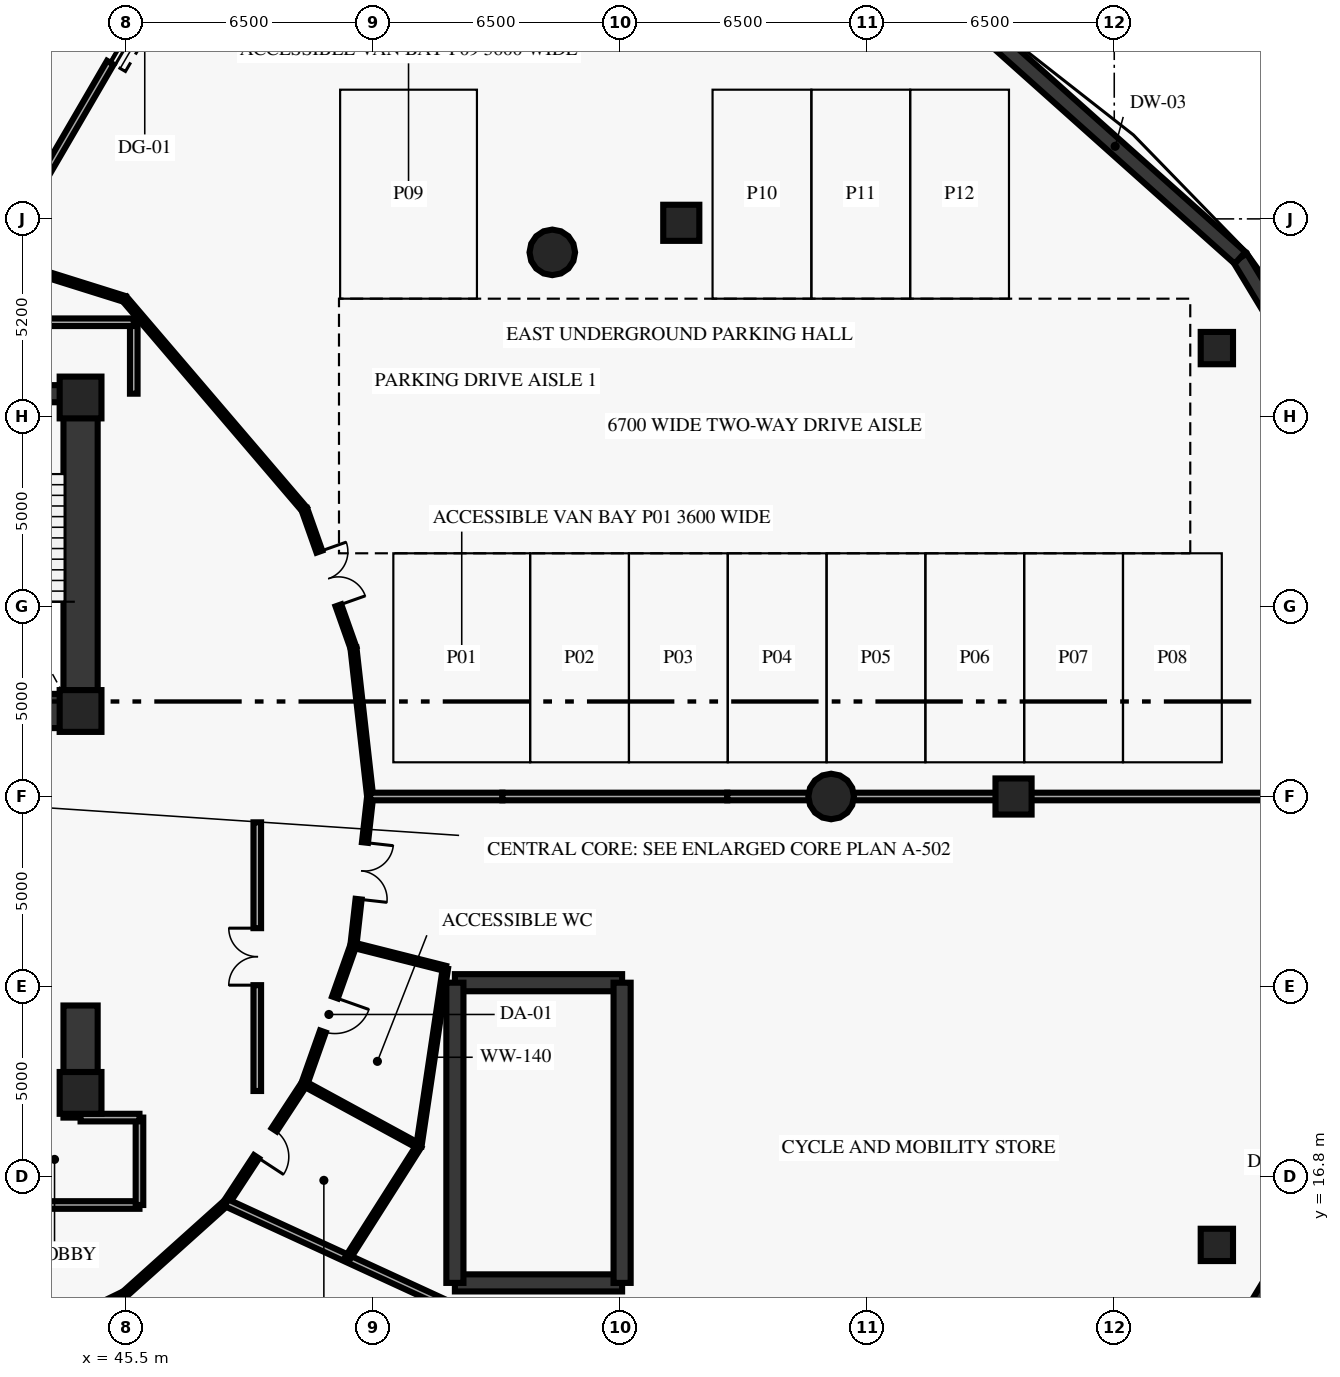
"""IFC4 building model, lengths in metres.
Left out: names, types, materials, properties, quantities, classifications, styles, units other than length and angle.
Written with IfcOpenShell. Run it as: python <this file> out.ifc"""

import sys

from ifc_helpers import new_model, si_unit, direction, frame, frame_2d, origin, origin_2d, place, context, subcontext, project, spatial, rectangle, circle, extrude, element, fill, save


model = new_model("IFC4")
c1 = context("Model", 3, precision=1e-05, world=origin(), true_north=direction((0.0, 1.0)))
c2 = subcontext(c1, "Body", "Model", "MODEL_VIEW")
j1 = project(units=[si_unit("LENGTHUNIT", "METRE"), si_unit("PLANEANGLEUNIT", "RADIAN")], contexts=[c1])
p1 = place(None, origin())
s1 = spatial("IfcSite", under=j1, at=p1, CompositionType="ELEMENT")
p2 = place(p1, origin())
s2 = spatial("IfcBuilding", under=s1, at=p2, CompositionType="ELEMENT")
p3 = place(p2, frame((0.0, 0.0, -4.5)))
s3 = spatial("IfcBuildingStorey", under=s2, at=p3, CompositionType="ELEMENT", Elevation=-4.5)
for number, where, z_axis, x_axis in (
    (1, (44.3, 19.0, 0.0), (0.0, 0.0, 1.0), (1.0, 0.0, 0.0)),
    (2, (44.3, 29.05, 0.0), (0.0, 0.0, 1.0), (1.0, 0.0, 0.0)),
    (3, (44.3, 37.3, 0.0), (0.0, 0.0, 1.0), (1.0, 0.0, 0.0)),
):
    element("IfcColumn", number, at=place(p3, frame(where, z_axis=z_axis, x_axis=x_axis)), inside=s3, PredefinedType="PILASTER", context=c2, shape_type="SweptSolid", body=[
        extrude(rectangle(XDim=1.1, YDim=1.1, at=origin_2d()), origin(), (0.0, 0.0, 1.0), 4.18),
    ])
for number, where, z_axis, x_axis in (
    (4, (64.05, 26.8, 0.0), (0.0, 0.0, 1.0), (1.0, 0.0, 0.0)),
    (5, (56.713, 41.119, 0.0), (0.0, 0.0, 1.0), (1.0, 0.0, 0.0)),
):
    element("IfcColumn", number, at=place(p3, frame(where, z_axis=z_axis, x_axis=x_axis)), inside=s3, PredefinedType="COLUMN", context=c2, shape_type="SweptSolid", body=[
        extrude(circle(Radius=0.6, at=origin_2d()), origin(), (0.0, 0.0, 1.0), 4.18),
    ])
for number, where, z_axis, x_axis in (
    (6, (68.85, 26.8, 0.0), (0.0, 0.0, 1.0), (1.0, 0.0, 0.0)),
    (7, (60.107, 41.897, 0.0), (0.0, 0.0, 1.0), (1.0, 0.0, 0.0)),
):
    element("IfcColumn", number, at=place(p3, frame(where, z_axis=z_axis, x_axis=x_axis)), inside=s3, PredefinedType="COLUMN", context=c2, shape_type="SweptSolid", body=[
        extrude(rectangle(XDim=0.95, YDim=0.95, at=origin_2d()), origin(), (0.0, 0.0, 1.0), 4.18),
    ])
for number, where, z_axis, x_axis in (
    (8, (74.2, 15.0, 0.0), (0.0, 0.0, 1.0), (1.0, 0.0, 0.0)),
    (9, (74.2, 38.6, 0.0), (0.0, 0.0, 1.0), (1.0, 0.0, 0.0)),
):
    element("IfcColumn", number, at=place(p3, frame(where, z_axis=z_axis, x_axis=x_axis)), inside=s3, PredefinedType="COLUMN", context=c2, shape_type="SweptSolid", body=[
        extrude(rectangle(XDim=0.85, YDim=0.85, at=origin_2d()), origin(), (0.0, 0.0, 1.0), 4.18),
    ])
p4 = place(p3, frame((44.3, 29.05, 0.0), z_axis=(0.0, 0.0, 1.0), x_axis=(0.0, 1.0, 0.0)))
e10 = element("IfcWall", 10, at=p4, inside=s3, PredefinedType="SHEAR", context=c2, shape_type="SweptSolid", body=[
    extrude(rectangle(XDim=8.35, YDim=0.9, at=frame_2d((4.175, 0.0))), origin(), (0.0, 0.0, 1.0), 4.18),
])
p5 = place(p3, frame((44.3, 18.35, 0.0), z_axis=(0.0, 0.0, 1.0), x_axis=(0.0, 1.0, 0.0)))
e11 = element("IfcWall", 11, at=p5, inside=s3, PredefinedType="SHEAR", context=c2, shape_type="SweptSolid", body=[
    extrude(rectangle(XDim=2.95, YDim=0.9, at=frame_2d((1.475, 0.0))), origin(), (0.0, 0.0, 1.0), 4.18),
])
p6 = place(p3, frame((33.7, 29.05, 0.0), z_axis=(0.0, 0.0, 1.0), x_axis=(1.0, 0.0, 0.0)))
e12 = element("IfcWall", 12, at=p6, inside=s3, PredefinedType="SHEAR", context=c2, shape_type="SweptSolid", body=[
    extrude(rectangle(XDim=10.6, YDim=0.9, at=frame_2d((5.3, 0.0))), origin(), (0.0, 0.0, 1.0), 4.18),
])
p7 = place(p3, frame((78.941, 34.138, 0.0), z_axis=(0.0, 0.0, 1.0), x_axis=(-0.517122636798, 0.85591131463, 0.0)))
e13 = element("IfcWall", 13, at=p7, inside=s3, PredefinedType="SHEAR", context=c2, shape_type="SweptSolid", body=[
    extrude(rectangle(XDim=7.988, YDim=0.42, at=frame_2d((3.994, 0.0))), origin(), (0.0, 0.0, 1.0), 4.18),
])
p8 = place(p3, frame((74.81, 40.975, 0.0), z_axis=(0.0, 0.0, 1.0), x_axis=(-0.745720826992, 0.666258544554, 0.0)))
e14 = element("IfcWall", 14, at=p8, inside=s3, PredefinedType="SHEAR", context=c2, shape_type="SweptSolid", body=[
    extrude(rectangle(XDim=8.812, YDim=0.42, at=frame_2d((4.406, 0.0))), origin(), (0.0, 0.0, 1.0), 4.18),
])
p9 = place(p3, frame((74.81, 12.625, 0.0), z_axis=(0.0, 0.0, 1.0), x_axis=(0.517136164524, 0.855903141332, 0.0)))
e15 = element("IfcWall", 15, at=p9, inside=s3, PredefinedType="SHEAR", context=c2, shape_type="SweptSolid", body=[
    extrude(rectangle(XDim=7.988, YDim=0.42, at=frame_2d((3.994, 0.0))), origin(), (0.0, 0.0, 1.0), 4.18),
])
p10 = place(p3, frame((44.3, 37.4, 0.0), z_axis=(0.0, 0.0, 1.0), x_axis=(-1.0, 0.0, 0.0)))
e16 = element("IfcWall", 16, at=p10, inside=s3, PredefinedType="SHEAR", context=c2, shape_type="SweptSolid", body=[
    extrude(rectangle(XDim=3.65, YDim=0.45, at=frame_2d((1.825, 0.0))), origin(), (0.0, 0.0, 1.0), 4.18),
])
p11 = place(p10, frame((1.25, 0.0, 0.0)))
e17 = element("IfcOpeningElement", 17, at=p11, cuts=e16, PredefinedType="OPENING", context=c2, shape_type="SweptSolid", body=[
    extrude(rectangle(XDim=1.15, YDim=2.15, at=frame_2d((0.575, 1.075))), frame((0.0, 0.235, 0.0), z_axis=(0.0, -1.0, 0.0), x_axis=(1.0, 0.0, 0.0)), (0.0, 0.0, 1.0), 0.47),
])
for number, where, z_axis, x_axis in (
    (18, (54.15, 14.0, 0.0), (0.0, 0.0, 1.0), (1.0, 0.0, 0.0)),
    (19, (54.15, 21.9, 0.0), (0.0, 0.0, 1.0), (1.0, 0.0, 0.0)),
):
    element("IfcWall", number, at=place(p3, frame(where, z_axis=z_axis, x_axis=x_axis)), inside=s3, PredefinedType="SHEAR", context=c2, shape_type="SweptSolid", body=[
        extrude(rectangle(XDim=4.4, YDim=0.45, at=frame_2d((2.2, 0.0))), origin(), (0.0, 0.0, 1.0), 4.18),
    ])
for number, where, z_axis, x_axis in (
    (20, (54.15, 14.0, 0.0), (0.0, 0.0, 1.0), (0.0, 1.0, 0.0)),
    (21, (58.55, 14.0, 0.0), (0.0, 0.0, 1.0), (0.0, 1.0, 0.0)),
):
    element("IfcWall", number, at=place(p3, frame(where, z_axis=z_axis, x_axis=x_axis)), inside=s3, PredefinedType="SHEAR", context=c2, shape_type="SweptSolid", body=[
        extrude(rectangle(XDim=7.9, YDim=0.45, at=frame_2d((3.95, 0.0))), origin(), (0.0, 0.0, 1.0), 4.18),
    ])
p12 = place(p3, frame((45.7, 37.4, 0.0), z_axis=(0.0, 0.0, 1.0), x_axis=(0.0, 1.0, 0.0)))
e22 = element("IfcWall", 22, at=p12, inside=s3, PredefinedType="SOLIDWALL", context=c2, shape_type="SweptSolid", body=[
    extrude(rectangle(XDim=1.88, YDim=0.2, at=frame_2d((0.94, 0.0))), origin(), (0.0, 0.0, 1.0), 4.18),
])
p13 = place(p3, frame((45.7, 39.28, 0.0), z_axis=(0.0, 0.0, 1.0), x_axis=(-1.0, 0.0, 0.0)))
e23 = element("IfcWall", 23, at=p13, inside=s3, PredefinedType="SOLIDWALL", context=c2, shape_type="SweptSolid", body=[
    extrude(rectangle(XDim=6.6, YDim=0.2, at=frame_2d((3.3, 0.0))), origin(), (0.0, 0.0, 1.0), 4.18),
])
p14 = place(p13, frame((4.35, 0.0, 0.0)))
e24 = element("IfcOpeningElement", 24, at=p14, cuts=e23, PredefinedType="OPENING", context=c2, shape_type="SweptSolid", body=[
    extrude(rectangle(XDim=1.6, YDim=2.2, at=frame_2d((0.8, 1.1))), frame((0.0, 0.11, 0.0), z_axis=(0.0, -1.0, 0.0), x_axis=(1.0, 0.0, 0.0)), (0.0, 0.0, 1.0), 0.22),
])
p15 = place(p3, frame((48.95, 19.05, 0.0), z_axis=(0.0, 0.0, 1.0), x_axis=(0.0, 1.0, 0.0)))
e25 = element("IfcWall", 25, at=p15, inside=s3, PredefinedType="SOLIDWALL", context=c2, shape_type="SweptSolid", body=[
    extrude(rectangle(XDim=7.07, YDim=0.2, at=frame_2d((3.535, 0.0))), origin(), (0.0, 0.0, 1.0), 4.18),
])
p16 = place(p15, frame((2.785, 0.0, 0.0)))
e26 = element("IfcOpeningElement", 26, at=p16, cuts=e25, PredefinedType="OPENING", context=c2, shape_type="SweptSolid", body=[
    extrude(rectangle(XDim=1.5, YDim=2.2, at=frame_2d((0.75, 1.1))), frame((0.0, 0.11, 0.0), z_axis=(0.0, -1.0, 0.0), x_axis=(1.0, 0.0, 0.0)), (0.0, 0.0, 1.0), 0.22),
])
p17 = place(p3, frame((41.35, 16.05, 0.0), z_axis=(0.0, 0.0, 1.0), x_axis=(1.0, 0.0, 0.0)))
e27 = element("IfcWall", 27, at=p17, inside=s3, PredefinedType="SOLIDWALL", context=c2, shape_type="SweptSolid", body=[
    extrude(rectangle(XDim=4.5, YDim=0.2, at=frame_2d((2.25, 0.0))), origin(), (0.0, 0.0, 1.0), 4.18),
])
p18 = place(p3, frame((45.85, 16.05, 0.0), z_axis=(0.0, 0.0, 1.0), x_axis=(0.0, 1.0, 0.0)))
e28 = element("IfcWall", 28, at=p18, inside=s3, PredefinedType="SOLIDWALL", context=c2, shape_type="SweptSolid", body=[
    extrude(rectangle(XDim=2.3, YDim=0.2, at=frame_2d((1.15, 0.0))), origin(), (0.0, 0.0, 1.0), 4.18),
])
p19 = place(p3, frame((44.3, 18.35, 0.0), z_axis=(0.0, 0.0, 1.0), x_axis=(1.0, 0.0, 0.0)))
e29 = element("IfcWall", 29, at=p19, inside=s3, PredefinedType="SOLIDWALL", context=c2, shape_type="SweptSolid", body=[
    extrude(rectangle(XDim=1.55, YDim=0.2, at=frame_2d((0.775, 0.0))), origin(), (0.0, 0.0, 1.0), 4.18),
])
p20 = place(p3, frame((51.92, 26.8, 0.0), z_axis=(0.0, 0.0, 1.0), x_axis=(-0.111731247657, 0.993738460711, 0.0)))
e30 = element("IfcWall", 30, at=p20, inside=s3, PredefinedType="PARTITIONING", context=c2, shape_type="SweptSolid", body=[
    extrude(rectangle(XDim=3.938, YDim=0.16, at=frame_2d((1.969, 0.0))), origin(), (0.0, 0.0, 1.0), 4.18),
])
p21 = place(p3, frame((50.189, 34.36, 0.0), z_axis=(0.0, 0.0, 1.0), x_axis=(0.333684770033, -0.942684716248, 0.0)))
e31 = element("IfcWall", 31, at=p21, inside=s3, PredefinedType="PARTITIONING", context=c2, shape_type="SweptSolid", body=[
    extrude(rectangle(XDim=3.869, YDim=0.16, at=frame_2d((1.935, 0.0))), origin(), (0.0, 0.0, 1.0), 4.18),
])
p22 = place(p21, frame((1.184, 0.0, 0.0)))
e32 = element("IfcOpeningElement", 32, at=p22, cuts=e31, PredefinedType="OPENING", context=c2, shape_type="SweptSolid", body=[
    extrude(rectangle(XDim=1.5, YDim=2.2, at=frame_2d((0.75, 1.1))), frame((0.0, 0.09, 0.0), z_axis=(0.0, -1.0, 0.0), x_axis=(1.0, 0.0, 0.0)), (0.0, 0.0, 1.0), 0.18),
])
p23 = place(p3, frame((50.189, 34.36, 0.0), z_axis=(0.0, 0.0, 1.0), x_axis=(-0.649652680018, 0.760231145998, 0.0)))
e33 = element("IfcWall", 33, at=p23, inside=s3, PredefinedType="PARTITIONING", context=c2, shape_type="SweptSolid", body=[
    extrude(rectangle(XDim=7.279, YDim=0.16, at=frame_2d((3.64, 0.0))), origin(), (0.0, 0.0, 1.0), 4.18),
])
p24 = place(p3, frame((45.46, 39.894, 0.0), z_axis=(0.0, 0.0, 1.0), x_axis=(-0.95417919824, 0.29923578938, 0.0)))
e34 = element("IfcWall", 34, at=p24, inside=s3, PredefinedType="PARTITIONING", context=c2, shape_type="SweptSolid", body=[
    extrude(rectangle(XDim=6.77, YDim=0.16, at=frame_2d((3.385, 0.0))), origin(), (0.0, 0.0, 1.0), 4.18),
])
p25 = place(p3, frame((45.46, 13.706, 0.0), z_axis=(0.0, 0.0, 1.0), x_axis=(-0.899789784655, -0.436323668199, 0.0)))
e35 = element("IfcWall", 35, at=p25, inside=s3, PredefinedType="PARTITIONING", context=c2, shape_type="SweptSolid", body=[
    extrude(rectangle(XDim=3.463, YDim=0.16, at=frame_2d((1.731, 0.0))), origin(), (0.0, 0.0, 1.0), 4.18),
])
p26 = place(p25, frame((0.982, 0.0, 0.0)))
e36 = element("IfcOpeningElement", 36, at=p26, cuts=e35, PredefinedType="OPENING", context=c2, shape_type="SweptSolid", body=[
    extrude(rectangle(XDim=1.5, YDim=2.2, at=frame_2d((0.75, 1.1))), frame((0.0, 0.09, 0.0), z_axis=(0.0, -1.0, 0.0), x_axis=(1.0, 0.0, 0.0)), (0.0, 0.0, 1.0), 0.18),
])
p27 = place(p3, frame((45.46, 13.706, 0.0), z_axis=(0.0, 0.0, 1.0), x_axis=(0.744066617248, 0.668105432621, 0.0)))
e37 = element("IfcWall", 37, at=p27, inside=s3, PredefinedType="PARTITIONING", context=c2, shape_type="SweptSolid", body=[
    extrude(rectangle(XDim=3.596, YDim=0.16, at=frame_2d((1.798, 0.0))), origin(), (0.0, 0.0, 1.0), 4.18),
])
p28 = place(p3, frame((50.189, 19.24, 0.0), z_axis=(0.0, 0.0, 1.0), x_axis=(-0.548318837904, -0.836269365694, 0.0)))
e38 = element("IfcWall", 38, at=p28, inside=s3, PredefinedType="PARTITIONING", context=c2, shape_type="SweptSolid", body=[
    extrude(rectangle(XDim=3.744, YDim=0.16, at=frame_2d((1.872, 0.0))), origin(), (0.0, 0.0, 1.0), 4.18),
])
p29 = place(p28, frame((1.447, 0.0, 0.0)))
e39 = element("IfcOpeningElement", 39, at=p29, cuts=e38, PredefinedType="OPENING", context=c2, shape_type="SweptSolid", body=[
    extrude(rectangle(XDim=0.85, YDim=2.1, at=frame_2d((0.425, 1.05))), frame((0.0, 0.09, 0.0), z_axis=(0.0, -1.0, 0.0), x_axis=(1.0, 0.0, 0.0)), (0.0, 0.0, 1.0), 0.18),
])
p30 = place(p3, frame((51.48, 22.887, 0.0), z_axis=(0.0, 0.0, 1.0), x_axis=(-0.333704620558, -0.942677689467, 0.0)))
e40 = element("IfcWall", 40, at=p30, inside=s3, PredefinedType="PARTITIONING", context=c2, shape_type="SweptSolid", body=[
    extrude(rectangle(XDim=3.869, YDim=0.16, at=frame_2d((1.934, 0.0))), origin(), (0.0, 0.0, 1.0), 4.18),
])
p31 = place(p30, frame((1.459, 0.0, 0.0)))
e41 = element("IfcOpeningElement", 41, at=p31, cuts=e40, PredefinedType="OPENING", context=c2, shape_type="SweptSolid", body=[
    extrude(rectangle(XDim=0.95, YDim=2.1, at=frame_2d((0.475, 1.05))), frame((0.0, 0.09, 0.0), z_axis=(0.0, -1.0, 0.0), x_axis=(1.0, 0.0, 0.0)), (0.0, 0.0, 1.0), 0.18),
])
p32 = place(p3, frame((51.92, 26.8, 0.0), z_axis=(0.0, 0.0, 1.0), x_axis=(-0.111724363671, -0.99373923469, 0.0)))
e42 = element("IfcWall", 42, at=p32, inside=s3, PredefinedType="PARTITIONING", context=c2, shape_type="SweptSolid", body=[
    extrude(rectangle(XDim=3.938, YDim=0.16, at=frame_2d((1.969, 0.0))), origin(), (0.0, 0.0, 1.0), 4.18),
])
p33 = place(p32, frame((1.219, 0.0, 0.0)))
e43 = element("IfcOpeningElement", 43, at=p33, cuts=e42, PredefinedType="OPENING", context=c2, shape_type="SweptSolid", body=[
    extrude(rectangle(XDim=1.5, YDim=2.2, at=frame_2d((0.75, 1.1))), frame((0.0, 0.09, 0.0), z_axis=(0.0, -1.0, 0.0), x_axis=(1.0, 0.0, 0.0)), (0.0, 0.0, 1.0), 0.18),
])
p34 = place(p3, frame((51.92, 26.8, 0.0), z_axis=(0.0, 0.0, 1.0), x_axis=(1.0, 0.0, 0.0)))
e44 = element("IfcWall", 44, at=p34, inside=s3, PredefinedType="SOLIDWALL", context=c2, shape_type="SweptSolid", body=[
    extrude(rectangle(XDim=3.48, YDim=0.2, at=frame_2d((1.74, 0.0))), origin(), (0.0, 0.0, 1.0), 4.18),
])
p35 = place(p3, frame((55.4, 26.8, 0.0), z_axis=(0.0, 0.0, 1.0), x_axis=(1.0, 0.0, 0.0)))
e45 = element("IfcWall", 45, at=p35, inside=s3, PredefinedType="SOLIDWALL", context=c2, shape_type="SweptSolid", body=[
    extrude(rectangle(XDim=5.917, YDim=0.2, at=frame_2d((2.958, 0.0))), origin(), (0.0, 0.0, 1.0), 4.18),
])
p36 = place(p3, frame((61.317, 26.8, 0.0), z_axis=(0.0, 0.0, 1.0), x_axis=(1.0, 0.0, 0.0)))
e46 = element("IfcWall", 46, at=p36, inside=s3, PredefinedType="SOLIDWALL", context=c2, shape_type="SweptSolid", body=[
    extrude(rectangle(XDim=7.533, YDim=0.2, at=frame_2d((3.767, 0.0))), origin(), (0.0, 0.0, 1.0), 3.14),
])
p37 = place(p3, frame((68.85, 26.8, 0.0), z_axis=(0.0, 0.0, 1.0), x_axis=(1.0, 0.0, 0.0)))
e47 = element("IfcWall", 47, at=p37, inside=s3, PredefinedType="SOLIDWALL", context=c2, shape_type="SweptSolid", body=[
    extrude(rectangle(XDim=11.235, YDim=0.2, at=frame_2d((5.617, 0.0))), origin(), (0.0, 0.0, 1.0), 4.18),
])
p38 = place(p3, frame((42.344, 41.405, 0.0), z_axis=(0.0, 0.0, 1.0), x_axis=(0.503097710949, 0.864229537355, 0.0)))
e48 = element("IfcWall", 48, at=p38, inside=s3, PredefinedType="SOLIDWALL", context=c2, shape_type="SweptSolid", body=[
    extrude(rectangle(XDim=14.49, YDim=0.2, at=frame_2d((7.245, 0.0))), origin(), (0.0, 0.0, 1.0), 4.18),
])
p39 = place(p38, frame((5.445, 0.0, 0.0)))
e49 = element("IfcOpeningElement", 49, at=p39, cuts=e48, PredefinedType="OPENING", context=c2, shape_type="SweptSolid", body=[
    extrude(rectangle(XDim=3.6, YDim=2.4, at=frame_2d((1.8, 1.2))), frame((0.0, 0.11, 0.0), z_axis=(0.0, -1.0, 0.0), x_axis=(1.0, 0.0, 0.0)), (0.0, 0.0, 1.0), 0.22),
])
p40 = place(p3, frame((48.136, 16.109, 0.0), z_axis=(0.0, 0.0, 1.0), x_axis=(0.908368089602, -0.418171512411, 0.0)))
e50 = element("IfcWall", 50, at=p40, inside=s3, PredefinedType="SOLIDWALL", context=c2, shape_type="SweptSolid", body=[
    extrude(rectangle(XDim=12.26, YDim=0.2, at=frame_2d((6.13, 0.0))), origin(), (0.0, 0.0, 1.0), 4.18),
])
p41 = place(p3, frame((50.189, 19.24, 0.0), z_axis=(0.0, 0.0, 1.0), x_axis=(0.878392721738, -0.477939563541, 0.0)))
e51 = element("IfcWall", 51, at=p41, inside=s3, PredefinedType="PARTITIONING", context=c2, shape_type="SweptSolid", body=[
    extrude(rectangle(XDim=3.431, YDim=0.14, at=frame_2d((1.716, 0.0))), origin(), (0.0, 0.0, 1.0), 4.18),
])
p42 = place(p3, frame((51.48, 22.887, 0.0), z_axis=(0.0, 0.0, 1.0), x_axis=(0.969564374521, -0.244836524357, 0.0)))
e52 = element("IfcWall", 52, at=p42, inside=s3, PredefinedType="PARTITIONING", context=c2, shape_type="SweptSolid", body=[
    extrude(rectangle(XDim=2.496, YDim=0.14, at=frame_2d((1.248, 0.0))), origin(), (0.0, 0.0, 1.0), 4.18),
])
p43 = place(p3, frame((51.322, 14.642, 0.0), z_axis=(0.0, 0.0, 1.0), x_axis=(0.53656900511, 0.84385644677, 0.0)))
e53 = element("IfcWall", 53, at=p43, inside=s3, PredefinedType="PARTITIONING", context=c2, shape_type="SweptSolid", body=[
    extrude(rectangle(XDim=3.505, YDim=0.14, at=frame_2d((1.753, 0.0))), origin(), (0.0, 0.0, 1.0), 4.18),
])
p44 = place(p3, frame((53.203, 17.6, 0.0), z_axis=(0.0, 0.0, 1.0), x_axis=(0.147441370436, 0.989070797407, 0.0)))
e54 = element("IfcWall", 54, at=p44, inside=s3, PredefinedType="PARTITIONING", context=c2, shape_type="SweptSolid", body=[
    extrude(rectangle(XDim=4.728, YDim=0.14, at=frame_2d((2.364, 0.0))), origin(), (0.0, 0.0, 1.0), 4.18),
])
p45 = place(p16, origin())
e55 = element("IfcDoor", 55, at=p45, inside=s3, OperationType="DOUBLE_DOOR_SINGLE_SWING", PredefinedType="DOOR", context=c2, shape_type="SweptSolid", body=[
    extrude(rectangle(XDim=1.5, YDim=2.2, at=frame_2d((0.75, 1.1))), frame((0.0, 0.025, 0.0), z_axis=(0.0, -1.0, 0.0), x_axis=(1.0, 0.0, 0.0)), (0.0, 0.0, 1.0), 0.05),
])
fill(e26, e55)
p46 = place(p22, origin())
e56 = element("IfcDoor", 56, at=p46, inside=s3, OperationType="DOUBLE_DOOR_SINGLE_SWING", PredefinedType="DOOR", context=c2, shape_type="SweptSolid", body=[
    extrude(rectangle(XDim=1.5, YDim=2.2, at=frame_2d((0.75, 1.1))), frame((0.0, 0.025, 0.0), z_axis=(0.0, -1.0, 0.0), x_axis=(1.0, 0.0, 0.0)), (0.0, 0.0, 1.0), 0.05),
])
fill(e32, e56)
p47 = place(p29, origin())
e57 = element("IfcDoor", 57, at=p47, inside=s3, OperationType="SINGLE_SWING_RIGHT", PredefinedType="DOOR", context=c2, shape_type="SweptSolid", body=[
    extrude(rectangle(XDim=0.85, YDim=2.1, at=frame_2d((0.425, 1.05))), frame((0.0, 0.025, 0.0), z_axis=(0.0, -1.0, 0.0), x_axis=(1.0, 0.0, 0.0)), (0.0, 0.0, 1.0), 0.05),
])
fill(e39, e57)
p48 = place(p31, origin())
e58 = element("IfcDoor", 58, at=p48, inside=s3, OperationType="SINGLE_SWING_LEFT", PredefinedType="DOOR", context=c2, shape_type="SweptSolid", body=[
    extrude(rectangle(XDim=0.95, YDim=2.1, at=frame_2d((0.475, 1.05))), frame((0.0, 0.025, 0.0), z_axis=(0.0, -1.0, 0.0), x_axis=(1.0, 0.0, 0.0)), (0.0, 0.0, 1.0), 0.05),
])
fill(e41, e58)
p49 = place(p33, origin())
e59 = element("IfcDoor", 59, at=p49, inside=s3, OperationType="DOUBLE_DOOR_SINGLE_SWING", PredefinedType="DOOR", context=c2, shape_type="SweptSolid", body=[
    extrude(rectangle(XDim=1.5, YDim=2.2, at=frame_2d((0.75, 1.1))), frame((0.0, 0.025, 0.0), z_axis=(0.0, -1.0, 0.0), x_axis=(1.0, 0.0, 0.0)), (0.0, 0.0, 1.0), 0.05),
])
fill(e43, e59)
p50 = place(p39, origin())
e60 = element("IfcDoor", 60, at=p50, inside=s3, OperationType="ROLLINGUP", PredefinedType="GATE", context=c2, shape_type="SweptSolid", body=[
    extrude(rectangle(XDim=3.6, YDim=2.4, at=frame_2d((1.8, 1.2))), frame((0.0, 0.025, 0.0), z_axis=(0.0, -1.0, 0.0), x_axis=(1.0, 0.0, 0.0)), (0.0, 0.0, 1.0), 0.05),
])
fill(e49, e60)
save(model, sys.argv[1])
